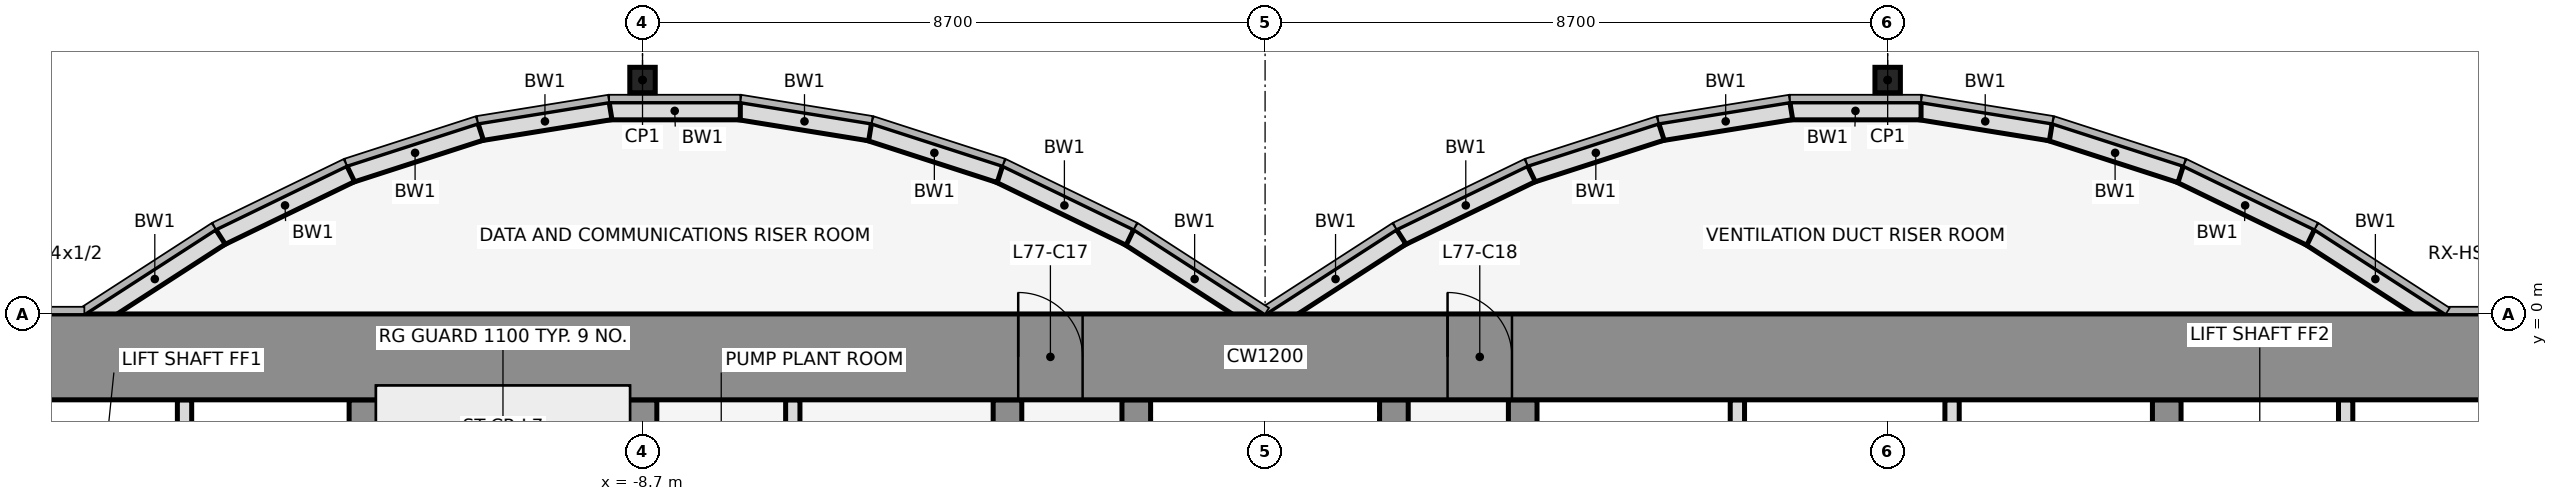
"""IFC4 building model, lengths in metres.
Left out: names, types, materials, properties, quantities, classifications, styles, units other than length and angle.
Written with IfcOpenShell. Run it as: python <this file> out.ifc"""

import sys

from ifc_helpers import new_model, si_unit, direction, frame, frame_2d, origin, origin_2d, place, context, subcontext, project, spatial, rectangle, hollow_rectangle, extrude, element, fill, save


model = new_model("IFC4")
c1 = context("Model", 3, precision=1e-05, world=origin(), true_north=direction((0.0, 1.0)))
c2 = subcontext(c1, "Body", "Model", "MODEL_VIEW")
j1 = project(units=[si_unit("LENGTHUNIT", "METRE"), si_unit("PLANEANGLEUNIT", "RADIAN")], contexts=[c1])
p1 = place(None, origin())
s1 = spatial("IfcSite", under=j1, at=p1, CompositionType="ELEMENT")
p2 = place(p1, origin())
s2 = spatial("IfcBuilding", under=s1, at=p2, CompositionType="ELEMENT")
p3 = place(p2, frame((0.0, 0.0, 342.5)))
s3 = spatial("IfcBuildingStorey", under=s2, at=p3, CompositionType="ELEMENT", Elevation=342.5)
for number, where, z_axis, x_axis in (
    (1, (-8.7, 3.269, 0.0), (0.0, 0.0, 1.0), (1.0, 0.0, 0.0)),
    (2, (8.7, 3.269, 0.0), (0.0, 0.0, 1.0), (1.0, 0.0, 0.0)),
):
    element("IfcColumn", number, at=place(p3, frame(where, z_axis=z_axis, x_axis=x_axis)), inside=s3, PredefinedType="COLUMN", context=c2, shape_type="SweptSolid", body=[
        extrude(hollow_rectangle(XDim=0.356, YDim=0.356, WallThickness=0.012, at=origin_2d()), origin(), (0.0, 0.0, 1.0), 5.4),
    ])
p4 = place(p3, frame((16.432, -0.105, 0.0), z_axis=(0.0, 0.0, 1.0), x_axis=(-0.83981312244, 0.542875602121, 0.0)))
e3 = element("IfcWall", 3, at=p4, inside=s3, PredefinedType="STANDARD", context=c2, shape_type="SweptSolid", body=[
    extrude(rectangle(XDim=2.183, YDim=0.25, at=frame_2d((1.091, 0.0))), origin(), (0.0, 0.0, 1.0), 5.2),
])
p5 = place(p3, frame((14.612, 1.073, 0.0), z_axis=(0.0, 0.0, 1.0), x_axis=(-0.89982408427, 0.436252928206, 0.0)))
e4 = element("IfcWall", 4, at=p5, inside=s3, PredefinedType="STANDARD", context=c2, shape_type="SweptSolid", body=[
    extrude(rectangle(XDim=2.038, YDim=0.25, at=frame_2d((1.019, 0.0))), origin(), (0.0, 0.0, 1.0), 5.2),
])
p6 = place(p3, frame((12.795, 1.955, 0.0), z_axis=(0.0, 0.0, 1.0), x_axis=(-0.951495806175, 0.307661714928, 0.0)))
e5 = element("IfcWall", 5, at=p6, inside=s3, PredefinedType="STANDARD", context=c2, shape_type="SweptSolid", body=[
    extrude(rectangle(XDim=1.927, YDim=0.25, at=frame_2d((0.963, 0.0))), origin(), (0.0, 0.0, 1.0), 5.2),
])
p7 = place(p3, frame((10.98, 2.543, 0.0), z_axis=(0.0, 0.0, 1.0), x_axis=(-0.987181718931, 0.159600293885, 0.0)))
e6 = element("IfcWall", 6, at=p7, inside=s3, PredefinedType="STANDARD", context=c2, shape_type="SweptSolid", body=[
    extrude(rectangle(XDim=1.857, YDim=0.25, at=frame_2d((0.929, 0.0))), origin(), (0.0, 0.0, 1.0), 5.2),
])
p8 = place(p3, frame((9.167, 2.838, 0.0), z_axis=(0.0, 0.0, 1.0), x_axis=(-1.0, 0.0, 0.0)))
e7 = element("IfcWall", 7, at=p8, inside=s3, PredefinedType="STANDARD", context=c2, shape_type="SweptSolid", body=[
    extrude(rectangle(XDim=1.833, YDim=0.25, at=frame_2d((0.917, 0.0))), origin(), (0.0, 0.0, 1.0), 5.2),
])
p9 = place(p3, frame((7.353, 2.84, 0.0), z_axis=(0.0, 0.0, 1.0), x_axis=(-0.987181718931, -0.159600293885, 0.0)))
e8 = element("IfcWall", 8, at=p9, inside=s3, PredefinedType="STANDARD", context=c2, shape_type="SweptSolid", body=[
    extrude(rectangle(XDim=1.857, YDim=0.25, at=frame_2d((0.929, 0.0))), origin(), (0.0, 0.0, 1.0), 5.2),
])
p10 = place(p3, frame((5.538, 2.548, 0.0), z_axis=(0.0, 0.0, 1.0), x_axis=(-0.951495806175, -0.307661714928, 0.0)))
e9 = element("IfcWall", 9, at=p10, inside=s3, PredefinedType="STANDARD", context=c2, shape_type="SweptSolid", body=[
    extrude(rectangle(XDim=1.927, YDim=0.25, at=frame_2d((0.963, 0.0))), origin(), (0.0, 0.0, 1.0), 5.2),
])
p11 = place(p3, frame((3.721, 1.962, 0.0), z_axis=(0.0, 0.0, 1.0), x_axis=(-0.89982408427, -0.436252928206, 0.0)))
e10 = element("IfcWall", 10, at=p11, inside=s3, PredefinedType="STANDARD", context=c2, shape_type="SweptSolid", body=[
    extrude(rectangle(XDim=2.038, YDim=0.25, at=frame_2d((1.019, 0.0))), origin(), (0.0, 0.0, 1.0), 5.2),
])
for number, where, z_axis, x_axis in (
    (11, (1.901, 1.08, 0.0), (0.0, 0.0, 1.0), (-0.84, -0.543, 0.0)),
    (12, (-0.068, -0.105, 0.0), (0.0, 0.0, 1.0), (-0.84, 0.543, 0.0)),
):
    element("IfcWall", number, at=place(p3, frame(where, z_axis=z_axis, x_axis=x_axis)), inside=s3, PredefinedType="STANDARD", context=c2, shape_type="SweptSolid", body=[
        extrude(rectangle(XDim=2.183, YDim=0.25, at=frame_2d((1.091, 0.0))), origin(), (0.0, 0.0, 1.0), 5.2),
    ])
p12 = place(p3, frame((-1.888, 1.073, 0.0), z_axis=(0.0, 0.0, 1.0), x_axis=(-0.89982408427, 0.436252928206, 0.0)))
e13 = element("IfcWall", 13, at=p12, inside=s3, PredefinedType="STANDARD", context=c2, shape_type="SweptSolid", body=[
    extrude(rectangle(XDim=2.038, YDim=0.25, at=frame_2d((1.019, 0.0))), origin(), (0.0, 0.0, 1.0), 5.2),
])
p13 = place(p3, frame((-3.705, 1.955, 0.0), z_axis=(0.0, 0.0, 1.0), x_axis=(-0.951495806175, 0.307661714928, 0.0)))
e14 = element("IfcWall", 14, at=p13, inside=s3, PredefinedType="STANDARD", context=c2, shape_type="SweptSolid", body=[
    extrude(rectangle(XDim=1.927, YDim=0.25, at=frame_2d((0.963, 0.0))), origin(), (0.0, 0.0, 1.0), 5.2),
])
p14 = place(p3, frame((-5.52, 2.543, 0.0), z_axis=(0.0, 0.0, 1.0), x_axis=(-0.987181718931, 0.159600293885, 0.0)))
e15 = element("IfcWall", 15, at=p14, inside=s3, PredefinedType="STANDARD", context=c2, shape_type="SweptSolid", body=[
    extrude(rectangle(XDim=1.857, YDim=0.25, at=frame_2d((0.929, 0.0))), origin(), (0.0, 0.0, 1.0), 5.2),
])
p15 = place(p3, frame((-7.333, 2.838, 0.0), z_axis=(0.0, 0.0, 1.0), x_axis=(-1.0, 0.0, 0.0)))
e16 = element("IfcWall", 16, at=p15, inside=s3, PredefinedType="STANDARD", context=c2, shape_type="SweptSolid", body=[
    extrude(rectangle(XDim=1.833, YDim=0.25, at=frame_2d((0.917, 0.0))), origin(), (0.0, 0.0, 1.0), 5.2),
])
p16 = place(p3, frame((-9.147, 2.84, 0.0), z_axis=(0.0, 0.0, 1.0), x_axis=(-0.987181718931, -0.159600293885, 0.0)))
e17 = element("IfcWall", 17, at=p16, inside=s3, PredefinedType="STANDARD", context=c2, shape_type="SweptSolid", body=[
    extrude(rectangle(XDim=1.857, YDim=0.25, at=frame_2d((0.929, 0.0))), origin(), (0.0, 0.0, 1.0), 5.2),
])
p17 = place(p3, frame((-10.962, 2.548, 0.0), z_axis=(0.0, 0.0, 1.0), x_axis=(-0.951495806175, -0.307661714928, 0.0)))
e18 = element("IfcWall", 18, at=p17, inside=s3, PredefinedType="STANDARD", context=c2, shape_type="SweptSolid", body=[
    extrude(rectangle(XDim=1.927, YDim=0.25, at=frame_2d((0.963, 0.0))), origin(), (0.0, 0.0, 1.0), 5.2),
])
p18 = place(p3, frame((-12.779, 1.962, 0.0), z_axis=(0.0, 0.0, 1.0), x_axis=(-0.89982408427, -0.436252928206, 0.0)))
e19 = element("IfcWall", 19, at=p18, inside=s3, PredefinedType="STANDARD", context=c2, shape_type="SweptSolid", body=[
    extrude(rectangle(XDim=2.038, YDim=0.25, at=frame_2d((1.019, 0.0))), origin(), (0.0, 0.0, 1.0), 5.2),
])
p19 = place(p3, frame((-14.599, 1.08, 0.0), z_axis=(0.0, 0.0, 1.0), x_axis=(-0.83981312244, -0.542875602121, 0.0)))
e20 = element("IfcWall", 20, at=p19, inside=s3, PredefinedType="STANDARD", context=c2, shape_type="SweptSolid", body=[
    extrude(rectangle(XDim=2.183, YDim=0.25, at=frame_2d((1.091, 0.0))), origin(), (0.0, 0.0, 1.0), 5.2),
])
p20 = place(p3, frame((-15.1, -4.6, 0.0), z_axis=(0.0, 0.0, 1.0), x_axis=(0.0, 1.0, 0.0)))
e21 = element("IfcWall", 21, at=p20, inside=s3, PredefinedType="PARTITIONING", context=c2, shape_type="SweptSolid", body=[
    extrude(rectangle(XDim=3.4, YDim=0.2, at=frame_2d((1.7, 0.0))), origin(), (0.0, 0.0, 1.0), 4.268),
])
p21 = place(p3, frame((-12.6, -11.8, 0.0), z_axis=(0.0, 0.0, 1.0), x_axis=(0.0, 1.0, 0.0)))
e22 = element("IfcWall", 22, at=p21, inside=s3, PredefinedType="SHEAR", context=c2, shape_type="SweptSolid", body=[
    extrude(rectangle(XDim=10.6, YDim=0.4, at=frame_2d((5.3, 0.0))), origin(), (0.0, 0.0, 1.0), 5.4),
])
p22 = place(p21, frame((1.25, 0.0, 0.0)))
e23 = element("IfcOpeningElement", 23, at=p22, cuts=e22, PredefinedType="OPENING", context=c2, shape_type="SweptSolid", body=[
    extrude(rectangle(XDim=1.1, YDim=2.1, at=frame_2d((0.55, 1.05))), frame((0.0, 0.212, 0.0), z_axis=(0.0, -1.0, 0.0), x_axis=(1.0, 0.0, 0.0)), (0.0, 0.0, 1.0), 0.424),
])
p23 = place(p3, frame((-8.7, -11.8, 0.0), z_axis=(0.0, 0.0, 1.0), x_axis=(0.0, 1.0, 0.0)))
e24 = element("IfcWall", 24, at=p23, inside=s3, PredefinedType="SHEAR", context=c2, shape_type="SweptSolid", body=[
    extrude(rectangle(XDim=10.6, YDim=0.4, at=frame_2d((5.3, 0.0))), origin(), (0.0, 0.0, 1.0), 5.4),
])
p24 = place(p3, frame((-6.6, -4.6, 0.0), z_axis=(0.0, 0.0, 1.0), x_axis=(0.0, 1.0, 0.0)))
e25 = element("IfcWall", 25, at=p24, inside=s3, PredefinedType="PARTITIONING", context=c2, shape_type="SweptSolid", body=[
    extrude(rectangle(XDim=3.4, YDim=0.2, at=frame_2d((1.7, 0.0))), origin(), (0.0, 0.0, 1.0), 4.268),
])
p25 = place(p3, frame((-3.6, -11.8, 0.0), z_axis=(0.0, 0.0, 1.0), x_axis=(0.0, 1.0, 0.0)))
e26 = element("IfcWall", 26, at=p25, inside=s3, PredefinedType="SHEAR", context=c2, shape_type="SweptSolid", body=[
    extrude(rectangle(XDim=10.6, YDim=0.4, at=frame_2d((5.3, 0.0))), origin(), (0.0, 0.0, 1.0), 5.4),
])
p26 = place(p25, frame((4.85, 0.0, 0.0)))
e27 = element("IfcOpeningElement", 27, at=p26, cuts=e26, PredefinedType="OPENING", context=c2, shape_type="SweptSolid", body=[
    extrude(rectangle(XDim=0.9, YDim=2.1, at=frame_2d((0.45, 1.05))), frame((0.0, 0.212, 0.0), z_axis=(0.0, -1.0, 0.0), x_axis=(1.0, 0.0, 0.0)), (0.0, 0.0, 1.0), 0.424),
])
for number, where, z_axis, x_axis in (
    (28, (-1.8, -11.8, 0.0), (0.0, 0.0, 1.0), (0.0, 1.0, 0.0)),
    (29, (1.8, -11.8, 0.0), (0.0, 0.0, 1.0), (0.0, 1.0, 0.0)),
):
    element("IfcWall", number, at=place(p3, frame(where, z_axis=z_axis, x_axis=x_axis)), inside=s3, PredefinedType="SHEAR", context=c2, shape_type="SweptSolid", body=[
        extrude(rectangle(XDim=10.6, YDim=0.4, at=frame_2d((5.3, 0.0))), origin(), (0.0, 0.0, 1.0), 5.4),
    ])
p27 = place(p3, frame((3.6, -11.8, 0.0), z_axis=(0.0, 0.0, 1.0), x_axis=(0.0, 1.0, 0.0)))
e30 = element("IfcWall", 30, at=p27, inside=s3, PredefinedType="SHEAR", context=c2, shape_type="SweptSolid", body=[
    extrude(rectangle(XDim=10.6, YDim=0.4, at=frame_2d((5.3, 0.0))), origin(), (0.0, 0.0, 1.0), 5.4),
])
p28 = place(p27, frame((4.85, 0.0, 0.0)))
e31 = element("IfcOpeningElement", 31, at=p28, cuts=e30, PredefinedType="OPENING", context=c2, shape_type="SweptSolid", body=[
    extrude(rectangle(XDim=0.9, YDim=2.1, at=frame_2d((0.45, 1.05))), frame((0.0, 0.212, 0.0), z_axis=(0.0, -1.0, 0.0), x_axis=(1.0, 0.0, 0.0)), (0.0, 0.0, 1.0), 0.424),
])
for number, where, z_axis, x_axis in (
    (32, (6.6, -4.6, 0.0), (0.0, 0.0, 1.0), (0.0, 1.0, 0.0)),
    (33, (9.6, -4.6, 0.0), (0.0, 0.0, 1.0), (0.0, 1.0, 0.0)),
):
    element("IfcWall", number, at=place(p3, frame(where, z_axis=z_axis, x_axis=x_axis)), inside=s3, PredefinedType="PARTITIONING", context=c2, shape_type="SweptSolid", body=[
        extrude(rectangle(XDim=3.4, YDim=0.2, at=frame_2d((1.7, 0.0))), origin(), (0.0, 0.0, 1.0), 4.268),
    ])
p29 = place(p3, frame((12.6, -11.8, 0.0), z_axis=(0.0, 0.0, 1.0), x_axis=(0.0, 1.0, 0.0)))
e34 = element("IfcWall", 34, at=p29, inside=s3, PredefinedType="SHEAR", context=c2, shape_type="SweptSolid", body=[
    extrude(rectangle(XDim=10.6, YDim=0.4, at=frame_2d((5.3, 0.0))), origin(), (0.0, 0.0, 1.0), 5.4),
])
p30 = place(p29, frame((4.75, 0.0, 0.0)))
e35 = element("IfcOpeningElement", 35, at=p30, cuts=e34, PredefinedType="OPENING", context=c2, shape_type="SweptSolid", body=[
    extrude(rectangle(XDim=1.1, YDim=2.1, at=frame_2d((0.55, 1.05))), frame((0.0, 0.212, 0.0), z_axis=(0.0, -1.0, 0.0), x_axis=(1.0, 0.0, 0.0)), (0.0, 0.0, 1.0), 0.424),
])
p31 = place(p3, frame((15.1, -4.6, 0.0), z_axis=(0.0, 0.0, 1.0), x_axis=(0.0, 1.0, 0.0)))
e36 = element("IfcWall", 36, at=p31, inside=s3, PredefinedType="PARTITIONING", context=c2, shape_type="SweptSolid", body=[
    extrude(rectangle(XDim=3.4, YDim=0.2, at=frame_2d((1.7, 0.0))), origin(), (0.0, 0.0, 1.0), 4.268),
])
p32 = place(p3, frame((-22.0, -0.6, 0.0), z_axis=(0.0, 0.0, 1.0), x_axis=(1.0, 0.0, 0.0)))
e37 = element("IfcWall", 37, at=p32, inside=s3, PredefinedType="SHEAR", context=c2, shape_type="SweptSolid", body=[
    extrude(rectangle(XDim=44.0, YDim=1.2, at=frame_2d((22.0, 0.0))), origin(), (0.0, 0.0, 1.0), 5.4),
])
p33 = place(p32, frame((18.55, 0.0, 0.0)))
e38 = element("IfcOpeningElement", 38, at=p33, cuts=e37, PredefinedType="OPENING", context=c2, shape_type="SweptSolid", body=[
    extrude(rectangle(XDim=0.9, YDim=2.1, at=frame_2d((0.45, 1.05))), frame((0.0, 0.612, 0.0), z_axis=(0.0, -1.0, 0.0), x_axis=(1.0, 0.0, 0.0)), (0.0, 0.0, 1.0), 1.224),
])
p34 = place(p32, frame((24.55, 0.0, 0.0)))
e39 = element("IfcOpeningElement", 39, at=p34, cuts=e37, PredefinedType="OPENING", context=c2, shape_type="SweptSolid", body=[
    extrude(rectangle(XDim=0.9, YDim=2.1, at=frame_2d((0.45, 1.05))), frame((0.0, 0.612, 0.0), z_axis=(0.0, -1.0, 0.0), x_axis=(1.0, 0.0, 0.0)), (0.0, 0.0, 1.0), 1.224),
])
p35 = place(p33, origin())
e40 = element("IfcDoor", 40, at=p35, inside=s3, OperationType="SINGLE_SWING_LEFT", PredefinedType="DOOR", context=c2, shape_type="SweptSolid", body=[
    extrude(rectangle(XDim=0.9, YDim=2.1, at=frame_2d((0.45, 1.05))), frame((0.0, 0.025, 0.0), z_axis=(0.0, -1.0, 0.0), x_axis=(1.0, 0.0, 0.0)), (0.0, 0.0, 1.0), 0.05),
])
fill(e38, e40)
p36 = place(p34, origin())
e41 = element("IfcDoor", 41, at=p36, inside=s3, OperationType="SINGLE_SWING_LEFT", PredefinedType="DOOR", context=c2, shape_type="SweptSolid", body=[
    extrude(rectangle(XDim=0.9, YDim=2.1, at=frame_2d((0.45, 1.05))), frame((0.0, 0.025, 0.0), z_axis=(0.0, -1.0, 0.0), x_axis=(1.0, 0.0, 0.0)), (0.0, 0.0, 1.0), 0.05),
])
fill(e39, e41)
save(model, sys.argv[1])
